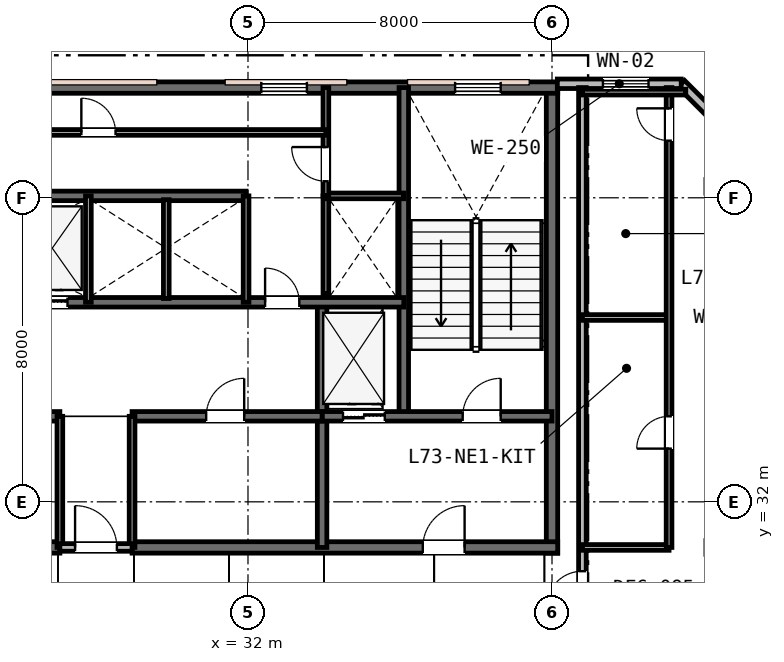
"""IFC4 building model, lengths in metres.
Left out: names, types, materials, properties, quantities, classifications, styles, units other than length and angle.
Written with IfcOpenShell. Run it as: python <this file> out.ifc"""

import sys

from ifc_helpers import new_model, si_unit, direction, frame, frame_2d, origin, place, context, subcontext, project, spatial, rectangle, extrude, element, fill, save


model = new_model("IFC4")
c1 = context("Model", 3, precision=1e-05, world=origin(), true_north=direction((0.0, 1.0)))
c2 = subcontext(c1, "Body", "Model", "MODEL_VIEW")
j1 = project(units=[si_unit("LENGTHUNIT", "METRE"), si_unit("PLANEANGLEUNIT", "RADIAN")], contexts=[c1])
p1 = place(None, origin())
s1 = spatial("IfcSite", under=j1, at=p1, CompositionType="ELEMENT")
p2 = place(p1, origin())
s2 = spatial("IfcBuilding", under=s1, at=p2, CompositionType="ELEMENT")
p3 = place(p2, frame((0.0, 0.0, 283.0)))
s3 = spatial("IfcBuildingStorey", under=s2, at=p3, CompositionType="ELEMENT", Elevation=283.0)
p4 = place(p3, frame((40.0, 30.65, 0.0), z_axis=(0.0, 0.0, 1.0), x_axis=(0.0, 1.0, 0.0)))
e1 = element("IfcWall", 1, at=p4, inside=s3, PredefinedType="SHEAR", context=c2, shape_type="SweptSolid", body=[
    extrude(rectangle(XDim=12.3, YDim=0.3, at=frame_2d((6.15, 0.0))), origin(), (0.0, 0.0, 1.0), 3.8),
])
p5 = place(p3, frame((15.85, 42.9, 0.0), z_axis=(0.0, 0.0, 1.0), x_axis=(1.0, 0.0, 0.0)))
e2 = element("IfcWall", 2, at=p5, inside=s3, PredefinedType="SHEAR", context=c2, shape_type="SweptSolid", body=[
    extrude(rectangle(XDim=24.3, YDim=0.3, at=frame_2d((12.15, 0.0))), origin(), (0.0, 0.0, 1.0), 3.8),
])
p6 = place(p5, frame((1.6, 0.0, 0.95)))
e3 = element("IfcOpeningElement", 3, at=p6, cuts=e2, PredefinedType="OPENING", context=c2, shape_type="SweptSolid", body=[
    extrude(rectangle(XDim=1.2, YDim=1.6, at=frame_2d((0.6, 0.8))), frame((0.0, 0.16, 0.0), z_axis=(0.0, -1.0, 0.0), x_axis=(1.0, 0.0, 0.0)), (0.0, 0.0, 1.0), 0.32),
])
p7 = place(p5, frame((16.5, 0.0, 0.95)))
e4 = element("IfcOpeningElement", 4, at=p7, cuts=e2, PredefinedType="OPENING", context=c2, shape_type="SweptSolid", body=[
    extrude(rectangle(XDim=1.2, YDim=1.6, at=frame_2d((0.6, 0.8))), frame((0.0, 0.16, 0.0), z_axis=(0.0, -1.0, 0.0), x_axis=(1.0, 0.0, 0.0)), (0.0, 0.0, 1.0), 0.32),
])
p8 = place(p5, frame((21.6, 0.0, 0.95)))
e5 = element("IfcOpeningElement", 5, at=p8, cuts=e2, PredefinedType="OPENING", context=c2, shape_type="SweptSolid", body=[
    extrude(rectangle(XDim=1.2, YDim=1.6, at=frame_2d((0.6, 0.8))), frame((0.0, 0.16, 0.0), z_axis=(0.0, -1.0, 0.0), x_axis=(1.0, 0.0, 0.0)), (0.0, 0.0, 1.0), 0.32),
])
p9 = place(p3, frame((15.85, 30.8, 0.0), z_axis=(0.0, 0.0, 1.0), x_axis=(1.0, 0.0, 0.0)))
e6 = element("IfcWall", 6, at=p9, inside=s3, PredefinedType="SHEAR", context=c2, shape_type="SweptSolid", body=[
    extrude(rectangle(XDim=11.2, YDim=0.3, at=frame_2d((5.6, 0.0))), origin(), (0.0, 0.0, 1.0), 3.8),
])
p10 = place(p9, frame((2.45, 0.0, 0.0)))
e7 = element("IfcOpeningElement", 7, at=p10, cuts=e6, PredefinedType="OPENING", context=c2, shape_type="SweptSolid", body=[
    extrude(rectangle(XDim=1.1, YDim=2.15, at=frame_2d((0.55, 1.075))), frame((0.0, 0.16, 0.0), z_axis=(0.0, -1.0, 0.0), x_axis=(1.0, 0.0, 0.0)), (0.0, 0.0, 1.0), 0.32),
])
p11 = place(p3, frame((28.95, 30.8, 0.0), z_axis=(0.0, 0.0, 1.0), x_axis=(1.0, 0.0, 0.0)))
e8 = element("IfcWall", 8, at=p11, inside=s3, PredefinedType="SHEAR", context=c2, shape_type="SweptSolid", body=[
    extrude(rectangle(XDim=11.2, YDim=0.3, at=frame_2d((5.6, 0.0))), origin(), (0.0, 0.0, 1.0), 3.8),
])
p12 = place(p11, frame((7.65, 0.0, 0.0)))
e9 = element("IfcOpeningElement", 9, at=p12, cuts=e8, PredefinedType="OPENING", context=c2, shape_type="SweptSolid", body=[
    extrude(rectangle(XDim=1.1, YDim=2.15, at=frame_2d((0.55, 1.075))), frame((0.0, 0.16, 0.0), z_axis=(0.0, -1.0, 0.0), x_axis=(1.0, 0.0, 0.0)), (0.0, 0.0, 1.0), 0.32),
])
p13 = place(p3, frame((36.1, 34.25, 0.0), z_axis=(0.0, 0.0, 1.0), x_axis=(0.0, 1.0, 0.0)))
e10 = element("IfcWall", 10, at=p13, inside=s3, PredefinedType="SHEAR", context=c2, shape_type="SweptSolid", body=[
    extrude(rectangle(XDim=8.65, YDim=0.25, at=frame_2d((4.325, 0.0))), origin(), (0.0, 0.0, 1.0), 3.8),
])
p14 = place(p3, frame((33.95, 30.8, 0.0), z_axis=(0.0, 0.0, 1.0), x_axis=(0.0, 1.0, 0.0)))
e11 = element("IfcWall", 11, at=p14, inside=s3, PredefinedType="SHEAR", context=c2, shape_type="SweptSolid", body=[
    extrude(rectangle(XDim=6.45, YDim=0.25, at=frame_2d((3.225, 0.0))), origin(), (0.0, 0.0, 1.0), 3.8),
])
p15 = place(p3, frame((33.95, 34.25, 0.0), z_axis=(0.0, 0.0, 1.0), x_axis=(1.0, 0.0, 0.0)))
e12 = element("IfcWall", 12, at=p15, inside=s3, PredefinedType="SHEAR", context=c2, shape_type="SweptSolid", body=[
    extrude(rectangle(XDim=6.05, YDim=0.25, at=frame_2d((3.025, 0.0))), origin(), (0.0, 0.0, 1.0), 3.8),
])
p16 = place(p15, frame((3.7, 0.0, 0.0)))
e13 = element("IfcOpeningElement", 13, at=p16, cuts=e12, PredefinedType="OPENING", context=c2, shape_type="SweptSolid", body=[
    extrude(rectangle(XDim=1.0, YDim=2.15, at=frame_2d((0.5, 1.075))), frame((0.0, 0.135, 0.0), z_axis=(0.0, -1.0, 0.0), x_axis=(1.0, 0.0, 0.0)), (0.0, 0.0, 1.0), 0.27),
])
p17 = place(p15, frame((0.55, 0.0, 0.0)))
e14 = element("IfcOpeningElement", 14, at=p17, cuts=e12, PredefinedType="OPENING", context=c2, shape_type="SweptSolid", body=[
    extrude(rectangle(XDim=1.1, YDim=2.15, at=frame_2d((0.55, 1.075))), frame((0.0, 0.135, 0.0), z_axis=(0.0, -1.0, 0.0), x_axis=(1.0, 0.0, 0.0)), (0.0, 0.0, 1.0), 0.27),
])
p18 = place(p3, frame((22.05, 34.25, 0.0), z_axis=(0.0, 0.0, 1.0), x_axis=(1.0, 0.0, 0.0)))
e15 = element("IfcWall", 15, at=p18, inside=s3, PredefinedType="SHEAR", context=c2, shape_type="SweptSolid", body=[
    extrude(rectangle(XDim=5.0, YDim=0.25, at=frame_2d((2.5, 0.0))), origin(), (0.0, 0.0, 1.0), 3.8),
])
p19 = place(p18, frame((1.95, 0.0, 0.0)))
e16 = element("IfcOpeningElement", 16, at=p19, cuts=e15, PredefinedType="OPENING", context=c2, shape_type="SweptSolid", body=[
    extrude(rectangle(XDim=1.0, YDim=2.15, at=frame_2d((0.5, 1.075))), frame((0.0, 0.135, 0.0), z_axis=(0.0, -1.0, 0.0), x_axis=(1.0, 0.0, 0.0)), (0.0, 0.0, 1.0), 0.27),
])
p20 = place(p3, frame((28.95, 34.25, 0.0), z_axis=(0.0, 0.0, 1.0), x_axis=(1.0, 0.0, 0.0)))
e17 = element("IfcWall", 17, at=p20, inside=s3, PredefinedType="SHEAR", context=c2, shape_type="SweptSolid", body=[
    extrude(rectangle(XDim=5.0, YDim=0.25, at=frame_2d((2.5, 0.0))), origin(), (0.0, 0.0, 1.0), 3.8),
])
p21 = place(p20, frame((1.95, 0.0, 0.0)))
e18 = element("IfcOpeningElement", 18, at=p21, cuts=e17, PredefinedType="OPENING", context=c2, shape_type="SweptSolid", body=[
    extrude(rectangle(XDim=1.0, YDim=2.15, at=frame_2d((0.5, 1.075))), frame((0.0, 0.135, 0.0), z_axis=(0.0, -1.0, 0.0), x_axis=(1.0, 0.0, 0.0)), (0.0, 0.0, 1.0), 0.27),
])
p22 = place(p3, frame((19.9, 37.25, 0.0), z_axis=(0.0, 0.0, 1.0), x_axis=(1.0, 0.0, 0.0)))
e19 = element("IfcWall", 19, at=p22, inside=s3, PredefinedType="SHEAR", context=c2, shape_type="SweptSolid", body=[
    extrude(rectangle(XDim=16.2, YDim=0.25, at=frame_2d((8.1, 0.0))), origin(), (0.0, 0.0, 1.0), 3.8),
])
p23 = place(p22, frame((12.55, 0.0, 0.0)))
e20 = element("IfcOpeningElement", 20, at=p23, cuts=e19, PredefinedType="OPENING", context=c2, shape_type="SweptSolid", body=[
    extrude(rectangle(XDim=0.9, YDim=2.15, at=frame_2d((0.45, 1.075))), frame((0.0, 0.135, 0.0), z_axis=(0.0, -1.0, 0.0), x_axis=(1.0, 0.0, 0.0)), (0.0, 0.0, 1.0), 0.27),
])
p24 = place(p22, frame((2.5, 0.0, 0.0)))
e21 = element("IfcOpeningElement", 21, at=p24, cuts=e19, PredefinedType="OPENING", context=c2, shape_type="SweptSolid", body=[
    extrude(rectangle(XDim=1.05, YDim=2.15, at=frame_2d((0.525, 1.075))), frame((0.0, 0.135, 0.0), z_axis=(0.0, -1.0, 0.0), x_axis=(1.0, 0.0, 0.0)), (0.0, 0.0, 1.0), 0.27),
])
p25 = place(p22, frame((4.4, 0.0, 0.0)))
e22 = element("IfcOpeningElement", 22, at=p25, cuts=e19, PredefinedType="OPENING", context=c2, shape_type="SweptSolid", body=[
    extrude(rectangle(XDim=1.05, YDim=2.15, at=frame_2d((0.525, 1.075))), frame((0.0, 0.135, 0.0), z_axis=(0.0, -1.0, 0.0), x_axis=(1.0, 0.0, 0.0)), (0.0, 0.0, 1.0), 0.27),
])
p26 = place(p22, frame((6.3, 0.0, 0.0)))
e23 = element("IfcOpeningElement", 23, at=p26, cuts=e19, PredefinedType="OPENING", context=c2, shape_type="SweptSolid", body=[
    extrude(rectangle(XDim=1.05, YDim=2.15, at=frame_2d((0.525, 1.075))), frame((0.0, 0.135, 0.0), z_axis=(0.0, -1.0, 0.0), x_axis=(1.0, 0.0, 0.0)), (0.0, 0.0, 1.0), 0.27),
])
p27 = place(p3, frame((19.9, 40.05, 0.0), z_axis=(0.0, 0.0, 1.0), x_axis=(1.0, 0.0, 0.0)))
e24 = element("IfcWall", 24, at=p27, inside=s3, PredefinedType="SHEAR", context=c2, shape_type="SweptSolid", body=[
    extrude(rectangle(XDim=12.05, YDim=0.25, at=frame_2d((6.025, 0.0))), origin(), (0.0, 0.0, 1.0), 3.8),
])
p28 = place(p3, frame((46.0, 40.4, 0.0), z_axis=(0.0, 0.0, 1.0), x_axis=(-0.707106781187, 0.707106781187, 0.0)))
e25 = element("IfcWall", 25, at=p28, inside=s3, PredefinedType="STANDARD", context=c2, shape_type="SweptSolid", body=[
    extrude(rectangle(XDim=3.677, YDim=0.25, at=frame_2d((1.839, 0.0))), origin(), (0.0, 0.0, 1.0), 3.53),
])
p29 = place(p28, frame((0.828, 0.0, 0.75)))
e26 = element("IfcOpeningElement", 26, at=p29, cuts=e25, PredefinedType="OPENING", context=c2, shape_type="SweptSolid", body=[
    extrude(rectangle(XDim=1.8, YDim=1.85, at=frame_2d((0.9, 0.925))), frame((0.0, 0.135, 0.0), z_axis=(0.0, -1.0, 0.0), x_axis=(1.0, 0.0, 0.0)), (0.0, 0.0, 1.0), 0.27),
])
p30 = place(p3, frame((43.4, 43.0, 0.0), z_axis=(0.0, 0.0, 1.0), x_axis=(-1.0, 0.0, 0.0)))
e27 = element("IfcWall", 27, at=p30, inside=s3, PredefinedType="STANDARD", context=c2, shape_type="SweptSolid", body=[
    extrude(rectangle(XDim=3.26, YDim=0.25, at=frame_2d((1.63, 0.0))), origin(), (0.0, 0.0, 1.0), 3.53),
])
p31 = place(p30, frame((0.86, 0.0, 0.85)))
e28 = element("IfcOpeningElement", 28, at=p31, cuts=e27, PredefinedType="OPENING", context=c2, shape_type="SweptSolid", body=[
    extrude(rectangle(XDim=1.2, YDim=1.6, at=frame_2d((0.6, 0.8))), frame((0.0, 0.135, 0.0), z_axis=(0.0, -1.0, 0.0), x_axis=(1.0, 0.0, 0.0)), (0.0, 0.0, 1.0), 0.27),
])
for number, where, z_axis, x_axis in (
    (29, (27.05, 30.8, 0.0), (0.0, 0.0, 1.0), (0.0, 1.0, 0.0)),
    (30, (28.95, 30.8, 0.0), (0.0, 0.0, 1.0), (0.0, 1.0, 0.0)),
):
    element("IfcWall", number, at=place(p3, frame(where, z_axis=z_axis, x_axis=x_axis)), inside=s3, PredefinedType="PLUMBINGWALL", context=c2, shape_type="SweptSolid", body=[
        extrude(rectangle(XDim=3.45, YDim=0.15, at=frame_2d((1.725, 0.0))), origin(), (0.0, 0.0, 1.0), 3.33),
    ])
p32 = place(p3, frame((27.05, 30.8, 0.0), z_axis=(0.0, 0.0, 1.0), x_axis=(1.0, 0.0, 0.0)))
e31 = element("IfcWall", 31, at=p32, inside=s3, PredefinedType="PARTITIONING", context=c2, shape_type="SweptSolid", body=[
    extrude(rectangle(XDim=1.9, YDim=0.2, at=frame_2d((0.95, 0.0))), origin(), (0.0, 0.0, 1.0), 3.33),
])
p33 = place(p32, frame((0.4, 0.0, 0.0)))
e32 = element("IfcOpeningElement", 32, at=p33, cuts=e31, PredefinedType="OPENING", context=c2, shape_type="SweptSolid", body=[
    extrude(rectangle(XDim=1.1, YDim=2.15, at=frame_2d((0.55, 1.075))), frame((0.0, 0.11, 0.0), z_axis=(0.0, -1.0, 0.0), x_axis=(1.0, 0.0, 0.0)), (0.0, 0.0, 1.0), 0.22),
])
for number, where, z_axis, x_axis in (
    (33, (27.8, 37.25, 0.0), (0.0, 0.0, 1.0), (0.0, 1.0, 0.0)),
    (34, (31.95, 37.25, 0.0), (0.0, 0.0, 1.0), (0.0, 1.0, 0.0)),
):
    element("IfcWall", number, at=place(p3, frame(where, z_axis=z_axis, x_axis=x_axis)), inside=s3, PredefinedType="PLUMBINGWALL", context=c2, shape_type="SweptSolid", body=[
        extrude(rectangle(XDim=2.8, YDim=0.15, at=frame_2d((1.4, 0.0))), origin(), (0.0, 0.0, 1.0), 3.53),
    ])
p34 = place(p3, frame((29.85, 37.35, 0.0), z_axis=(0.0, 0.0, 1.0), x_axis=(0.0, 1.0, 0.0)))
e35 = element("IfcWall", 35, at=p34, inside=s3, PredefinedType="PLUMBINGWALL", context=c2, shape_type="SweptSolid", body=[
    extrude(rectangle(XDim=2.6, YDim=0.15, at=frame_2d((1.3, 0.0))), origin(), (0.0, 0.0, 1.0), 3.53),
])
p35 = place(p3, frame((34.05, 37.473, 0.0), z_axis=(0.0, 0.0, 1.0), x_axis=(0.0, 1.0, 0.0)))
e36 = element("IfcWall", 36, at=p35, inside=s3, PredefinedType="PLUMBINGWALL", context=c2, shape_type="SweptSolid", body=[
    extrude(rectangle(XDim=2.577, YDim=0.15, at=frame_2d((1.288, 0.0))), origin(), (0.0, 0.0, 1.0), 3.53),
])
p36 = place(p3, frame((34.05, 40.05, 0.0), z_axis=(0.0, 0.0, 1.0), x_axis=(1.0, 0.0, 0.0)))
e37 = element("IfcWall", 37, at=p36, inside=s3, PredefinedType="PARTITIONING", context=c2, shape_type="SweptSolid", body=[
    extrude(rectangle(XDim=2.05, YDim=0.15, at=frame_2d((1.025, 0.0))), origin(), (0.0, 0.0, 1.0), 3.53),
])
p37 = place(p3, frame((34.05, 40.05, 0.0), z_axis=(0.0, 0.0, 1.0), x_axis=(0.0, 1.0, 0.0)))
e38 = element("IfcWall", 38, at=p37, inside=s3, PredefinedType="PARTITIONING", context=c2, shape_type="SweptSolid", body=[
    extrude(rectangle(XDim=2.85, YDim=0.15, at=frame_2d((1.425, 0.0))), origin(), (0.0, 0.0, 1.0), 3.53),
])
p38 = place(p37, frame((0.385, 0.0, 0.0)))
e39 = element("IfcOpeningElement", 39, at=p38, cuts=e38, PredefinedType="OPENING", context=c2, shape_type="SweptSolid", body=[
    extrude(rectangle(XDim=0.9, YDim=2.15, at=frame_2d((0.45, 1.075))), frame((0.0, 0.085, 0.0), z_axis=(0.0, -1.0, 0.0), x_axis=(1.0, 0.0, 0.0)), (0.0, 0.0, 1.0), 0.17),
])
p39 = place(p3, frame((22.08, 41.72, 0.0), z_axis=(0.0, 0.0, 1.0), x_axis=(1.0, 0.0, 0.0)))
e40 = element("IfcWall", 40, at=p39, inside=s3, PredefinedType="PARTITIONING", context=c2, shape_type="SweptSolid", body=[
    extrude(rectangle(XDim=11.97, YDim=0.15, at=frame_2d((5.985, 0.0))), origin(), (0.0, 0.0, 1.0), 3.53),
])
p40 = place(p39, frame((5.535, 0.0, 0.0)))
e41 = element("IfcOpeningElement", 41, at=p40, cuts=e40, PredefinedType="OPENING", context=c2, shape_type="SweptSolid", body=[
    extrude(rectangle(XDim=0.9, YDim=2.15, at=frame_2d((0.45, 1.075))), frame((0.0, 0.085, 0.0), z_axis=(0.0, -1.0, 0.0), x_axis=(1.0, 0.0, 0.0)), (0.0, 0.0, 1.0), 0.17),
])
p41 = place(p3, frame((40.8, 28.6, 0.0), z_axis=(0.0, 0.0, 1.0), x_axis=(0.0, 1.0, 0.0)))
e42 = element("IfcWall", 42, at=p41, inside=s3, PredefinedType="PARTITIONING", context=c2, shape_type="SweptSolid", body=[
    extrude(rectangle(XDim=14.3, YDim=0.2, at=frame_2d((7.15, 0.0))), origin(), (0.0, 0.0, 1.0), 3.24),
])
p42 = place(p41, frame((0.625, 0.0, 0.0)))
e43 = element("IfcOpeningElement", 43, at=p42, cuts=e42, PredefinedType="OPENING", context=c2, shape_type="SweptSolid", body=[
    extrude(rectangle(XDim=0.95, YDim=2.15, at=frame_2d((0.475, 1.075))), frame((0.0, 0.11, 0.0), z_axis=(0.0, -1.0, 0.0), x_axis=(1.0, 0.0, 0.0)), (0.0, 0.0, 1.0), 0.22),
])
p43 = place(p3, frame((40.8, 30.8, 0.0), z_axis=(0.0, 0.0, 1.0), x_axis=(1.0, 0.0, 0.0)))
e44 = element("IfcWall", 44, at=p43, inside=s3, PredefinedType="PARTITIONING", context=c2, shape_type="SweptSolid", body=[
    extrude(rectangle(XDim=2.28, YDim=0.15, at=frame_2d((1.14, 0.0))), origin(), (0.0, 0.0, 1.0), 3.24),
])
p44 = place(p3, frame((40.8, 36.85, 0.0), z_axis=(0.0, 0.0, 1.0), x_axis=(1.0, 0.0, 0.0)))
e45 = element("IfcWall", 45, at=p44, inside=s3, PredefinedType="PARTITIONING", context=c2, shape_type="SweptSolid", body=[
    extrude(rectangle(XDim=2.28, YDim=0.15, at=frame_2d((1.14, 0.0))), origin(), (0.0, 0.0, 1.0), 3.53),
])
p45 = place(p3, frame((43.08, 30.8, 0.0), z_axis=(0.0, 0.0, 1.0), x_axis=(0.0, 1.0, 0.0)))
e46 = element("IfcWall", 46, at=p45, inside=s3, PredefinedType="PARTITIONING", context=c2, shape_type="SweptSolid", body=[
    extrude(rectangle(XDim=12.1, YDim=0.15, at=frame_2d((6.05, 0.0))), origin(), (0.0, 0.0, 1.0), 3.24),
])
p46 = place(p45, frame((2.6, 0.0, 0.0)))
e47 = element("IfcOpeningElement", 47, at=p46, cuts=e46, PredefinedType="OPENING", context=c2, shape_type="SweptSolid", body=[
    extrude(rectangle(XDim=0.85, YDim=2.15, at=frame_2d((0.425, 1.075))), frame((0.0, 0.085, 0.0), z_axis=(0.0, -1.0, 0.0), x_axis=(1.0, 0.0, 0.0)), (0.0, 0.0, 1.0), 0.17),
])
p47 = place(p45, frame((10.704, 0.0, 0.0)))
e48 = element("IfcOpeningElement", 48, at=p47, cuts=e46, PredefinedType="OPENING", context=c2, shape_type="SweptSolid", body=[
    extrude(rectangle(XDim=0.85, YDim=2.15, at=frame_2d((0.425, 1.075))), frame((0.0, 0.085, 0.0), z_axis=(0.0, -1.0, 0.0), x_axis=(1.0, 0.0, 0.0)), (0.0, 0.0, 1.0), 0.17),
])
p48 = place(p3, frame((40.8, 42.78, 0.0), z_axis=(0.0, 0.0, 1.0), x_axis=(1.0, 0.0, 0.0)))
e49 = element("IfcWall", 49, at=p48, inside=s3, PredefinedType="PARTITIONING", context=c2, shape_type="SweptSolid", body=[
    extrude(rectangle(XDim=2.72, YDim=0.15, at=frame_2d((1.36, 0.0))), origin(), (0.0, 0.0, 1.0), 3.53),
])
p49 = place(p7, origin())
e50 = element("IfcWindow", 50, at=p49, inside=s3, PartitioningType="SINGLE_PANEL", PredefinedType="WINDOW", context=c2, shape_type="SweptSolid", body=[
    extrude(rectangle(XDim=1.2, YDim=1.6, at=frame_2d((0.6, 0.8))), frame((0.0, 0.03, 0.0), z_axis=(0.0, -1.0, 0.0), x_axis=(1.0, 0.0, 0.0)), (0.0, 0.0, 1.0), 0.06),
])
fill(e4, e50)
p50 = place(p8, origin())
e51 = element("IfcWindow", 51, at=p50, inside=s3, PartitioningType="SINGLE_PANEL", PredefinedType="WINDOW", context=c2, shape_type="SweptSolid", body=[
    extrude(rectangle(XDim=1.2, YDim=1.6, at=frame_2d((0.6, 0.8))), frame((0.0, 0.03, 0.0), z_axis=(0.0, -1.0, 0.0), x_axis=(1.0, 0.0, 0.0)), (0.0, 0.0, 1.0), 0.06),
])
fill(e5, e51)
p51 = place(p31, origin())
e52 = element("IfcWindow", 52, at=p51, inside=s3, PartitioningType="SINGLE_PANEL", PredefinedType="WINDOW", context=c2, shape_type="SweptSolid", body=[
    extrude(rectangle(XDim=1.2, YDim=1.6, at=frame_2d((0.6, 0.8))), frame((0.0, 0.03, 0.0), z_axis=(0.0, -1.0, 0.0), x_axis=(1.0, 0.0, 0.0)), (0.0, 0.0, 1.0), 0.06),
])
fill(e28, e52)
p52 = place(p33, origin())
e53 = element("IfcDoor", 53, at=p52, inside=s3, OperationType="SINGLE_SWING_LEFT", PredefinedType="DOOR", context=c2, shape_type="SweptSolid", body=[
    extrude(rectangle(XDim=1.1, YDim=2.15, at=frame_2d((0.55, 1.075))), frame((0.0, 0.025, 0.0), z_axis=(0.0, -1.0, 0.0), x_axis=(1.0, 0.0, 0.0)), (0.0, 0.0, 1.0), 0.05),
])
fill(e32, e53)
p53 = place(p16, origin())
e54 = element("IfcDoor", 54, at=p53, inside=s3, OperationType="SINGLE_SWING_RIGHT", PredefinedType="DOOR", context=c2, shape_type="SweptSolid", body=[
    extrude(rectangle(XDim=1.0, YDim=2.15, at=frame_2d((0.5, 1.075))), frame((0.0, 0.025, 0.0), z_axis=(0.0, -1.0, 0.0), x_axis=(1.0, 0.0, 0.0)), (0.0, 0.0, 1.0), 0.05),
])
fill(e13, e54)
p54 = place(p12, origin())
e55 = element("IfcDoor", 55, at=p54, inside=s3, OperationType="SINGLE_SWING_RIGHT", PredefinedType="DOOR", context=c2, shape_type="SweptSolid", body=[
    extrude(rectangle(XDim=1.1, YDim=2.15, at=frame_2d((0.55, 1.075))), frame((0.0, 0.025, 0.0), z_axis=(0.0, -1.0, 0.0), x_axis=(1.0, 0.0, 0.0)), (0.0, 0.0, 1.0), 0.05),
])
fill(e9, e55)
p55 = place(p21, origin())
e56 = element("IfcDoor", 56, at=p55, inside=s3, OperationType="SINGLE_SWING_RIGHT", PredefinedType="DOOR", context=c2, shape_type="SweptSolid", body=[
    extrude(rectangle(XDim=1.0, YDim=2.15, at=frame_2d((0.5, 1.075))), frame((0.0, 0.025, 0.0), z_axis=(0.0, -1.0, 0.0), x_axis=(1.0, 0.0, 0.0)), (0.0, 0.0, 1.0), 0.05),
])
fill(e18, e56)
p56 = place(p23, origin())
e57 = element("IfcDoor", 57, at=p56, inside=s3, OperationType="SINGLE_SWING_LEFT", PredefinedType="DOOR", context=c2, shape_type="SweptSolid", body=[
    extrude(rectangle(XDim=0.9, YDim=2.15, at=frame_2d((0.45, 1.075))), frame((0.0, 0.025, 0.0), z_axis=(0.0, -1.0, 0.0), x_axis=(1.0, 0.0, 0.0)), (0.0, 0.0, 1.0), 0.05),
])
fill(e20, e57)
p57 = place(p38, origin())
e58 = element("IfcDoor", 58, at=p57, inside=s3, OperationType="SINGLE_SWING_RIGHT", PredefinedType="DOOR", context=c2, shape_type="SweptSolid", body=[
    extrude(rectangle(XDim=0.9, YDim=2.15, at=frame_2d((0.45, 1.075))), frame((0.0, 0.025, 0.0), z_axis=(0.0, -1.0, 0.0), x_axis=(1.0, 0.0, 0.0)), (0.0, 0.0, 1.0), 0.05),
])
fill(e39, e58)
p58 = place(p40, origin())
e59 = element("IfcDoor", 59, at=p58, inside=s3, OperationType="SINGLE_SWING_LEFT", PredefinedType="DOOR", context=c2, shape_type="SweptSolid", body=[
    extrude(rectangle(XDim=0.9, YDim=2.15, at=frame_2d((0.45, 1.075))), frame((0.0, 0.025, 0.0), z_axis=(0.0, -1.0, 0.0), x_axis=(1.0, 0.0, 0.0)), (0.0, 0.0, 1.0), 0.05),
])
fill(e41, e59)
p59 = place(p42, origin())
e60 = element("IfcDoor", 60, at=p59, inside=s3, OperationType="SINGLE_SWING_LEFT", PredefinedType="DOOR", context=c2, shape_type="SweptSolid", body=[
    extrude(rectangle(XDim=0.95, YDim=2.15, at=frame_2d((0.475, 1.075))), frame((0.0, 0.025, 0.0), z_axis=(0.0, -1.0, 0.0), x_axis=(1.0, 0.0, 0.0)), (0.0, 0.0, 1.0), 0.05),
])
fill(e43, e60)
p60 = place(p46, origin())
e61 = element("IfcDoor", 61, at=p60, inside=s3, OperationType="SINGLE_SWING_LEFT", PredefinedType="DOOR", context=c2, shape_type="SweptSolid", body=[
    extrude(rectangle(XDim=0.85, YDim=2.15, at=frame_2d((0.425, 1.075))), frame((0.0, 0.025, 0.0), z_axis=(0.0, -1.0, 0.0), x_axis=(1.0, 0.0, 0.0)), (0.0, 0.0, 1.0), 0.05),
])
fill(e47, e61)
p61 = place(p47, origin())
e62 = element("IfcDoor", 62, at=p61, inside=s3, OperationType="SINGLE_SWING_RIGHT", PredefinedType="DOOR", context=c2, shape_type="SweptSolid", body=[
    extrude(rectangle(XDim=0.85, YDim=2.15, at=frame_2d((0.425, 1.075))), frame((0.0, 0.025, 0.0), z_axis=(0.0, -1.0, 0.0), x_axis=(1.0, 0.0, 0.0)), (0.0, 0.0, 1.0), 0.05),
])
fill(e48, e62)
p62 = place(p17, origin())
e63 = element("IfcDoor", 63, at=p62, inside=s3, OperationType="DOUBLE_DOOR_SLIDING", PredefinedType="DOOR", context=c2, shape_type="SweptSolid", body=[
    extrude(rectangle(XDim=1.1, YDim=2.15, at=frame_2d((0.55, 1.075))), frame((0.0, 0.025, 0.0), z_axis=(0.0, -1.0, 0.0), x_axis=(1.0, 0.0, 0.0)), (0.0, 0.0, 1.0), 0.05),
])
fill(e14, e63)
p63 = place(p26, origin())
e64 = element("IfcDoor", 64, at=p63, inside=s3, OperationType="DOUBLE_DOOR_SLIDING", PredefinedType="DOOR", context=c2, shape_type="SweptSolid", body=[
    extrude(rectangle(XDim=1.05, YDim=2.15, at=frame_2d((0.525, 1.075))), frame((0.0, 0.025, 0.0), z_axis=(0.0, -1.0, 0.0), x_axis=(1.0, 0.0, 0.0)), (0.0, 0.0, 1.0), 0.05),
])
fill(e23, e64)
save(model, sys.argv[1])
